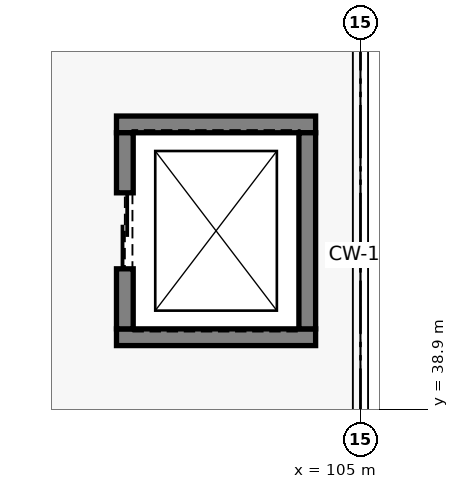
"""IFC4 building model, lengths in metres.
Left out: names, types, materials, properties, quantities, classifications, styles, units other than length and angle.
Written with IfcOpenShell. Run it as: python <this file> out.ifc"""

import sys

from ifc_helpers import new_model, si_unit, direction, frame, frame_2d, origin, place, context, subcontext, project, spatial, rectangle, extrude, element, fill, save


model = new_model("IFC4")
c1 = context("Model", 3, precision=1e-05, world=origin(), true_north=direction((0.0, 1.0)))
c2 = subcontext(c1, "Body", "Model", "MODEL_VIEW")
j1 = project(units=[si_unit("LENGTHUNIT", "METRE"), si_unit("PLANEANGLEUNIT", "RADIAN")], contexts=[c1])
p1 = place(None, origin())
s1 = spatial("IfcSite", under=j1, at=p1, CompositionType="ELEMENT")
p2 = place(p1, origin())
s2 = spatial("IfcBuilding", under=s1, at=p2, CompositionType="ELEMENT")
p3 = place(p2, frame((0.0, 0.0, 17.1)))
s3 = spatial("IfcBuildingStorey", under=s2, at=p3, CompositionType="ELEMENT", Elevation=17.1)
for number, where, z_axis, x_axis in (
    (1, (101.79, 39.85, 0.0), (0.0, 0.0, 1.0), (1.0, 0.0, 0.0)),
    (2, (101.79, 42.65, 0.0), (0.0, 0.0, 1.0), (1.0, 0.0, 0.0)),
):
    element("IfcWall", number, at=place(p3, frame(where, z_axis=z_axis, x_axis=x_axis)), inside=s3, PredefinedType="SOLIDWALL", context=c2, shape_type="SweptSolid", body=[
        extrude(rectangle(XDim=2.62, YDim=0.22, at=frame_2d((1.31, 0.0))), origin(), (0.0, 0.0, 1.0), 3.62),
    ])
p4 = place(p3, frame((101.9, 39.96, 0.0), z_axis=(0.0, 0.0, 1.0), x_axis=(0.0, 1.0, 0.0)))
e3 = element("IfcWall", 3, at=p4, inside=s3, PredefinedType="SOLIDWALL", context=c2, shape_type="SweptSolid", body=[
    extrude(rectangle(XDim=2.58, YDim=0.22, at=frame_2d((1.29, 0.0))), origin(), (0.0, 0.0, 1.0), 3.62),
])
p5 = place(p4, frame((0.79, 0.0, 0.0)))
e4 = element("IfcOpeningElement", 4, at=p5, cuts=e3, PredefinedType="OPENING", context=c2, shape_type="SweptSolid", body=[
    extrude(rectangle(XDim=1.0, YDim=2.15, at=frame_2d((0.5, 1.075))), frame((0.0, 0.12, 0.0), z_axis=(0.0, -1.0, 0.0), x_axis=(1.0, 0.0, 0.0)), (0.0, 0.0, 1.0), 0.24),
])
p6 = place(p3, frame((104.3, 39.96, 0.0), z_axis=(0.0, 0.0, 1.0), x_axis=(0.0, 1.0, 0.0)))
e5 = element("IfcWall", 5, at=p6, inside=s3, PredefinedType="SOLIDWALL", context=c2, shape_type="SweptSolid", body=[
    extrude(rectangle(XDim=2.58, YDim=0.22, at=frame_2d((1.29, 0.0))), origin(), (0.0, 0.0, 1.0), 3.62),
])
p7 = place(p5, origin())
e6 = element("IfcDoor", 6, at=p7, inside=s3, OperationType="SLIDING_TO_LEFT", PredefinedType="DOOR", context=c2, shape_type="SweptSolid", body=[
    extrude(rectangle(XDim=1.0, YDim=2.15, at=frame_2d((0.5, 1.075))), frame((0.0, 0.025, 0.0), z_axis=(0.0, -1.0, 0.0), x_axis=(1.0, 0.0, 0.0)), (0.0, 0.0, 1.0), 0.05),
])
fill(e4, e6)
save(model, sys.argv[1])
